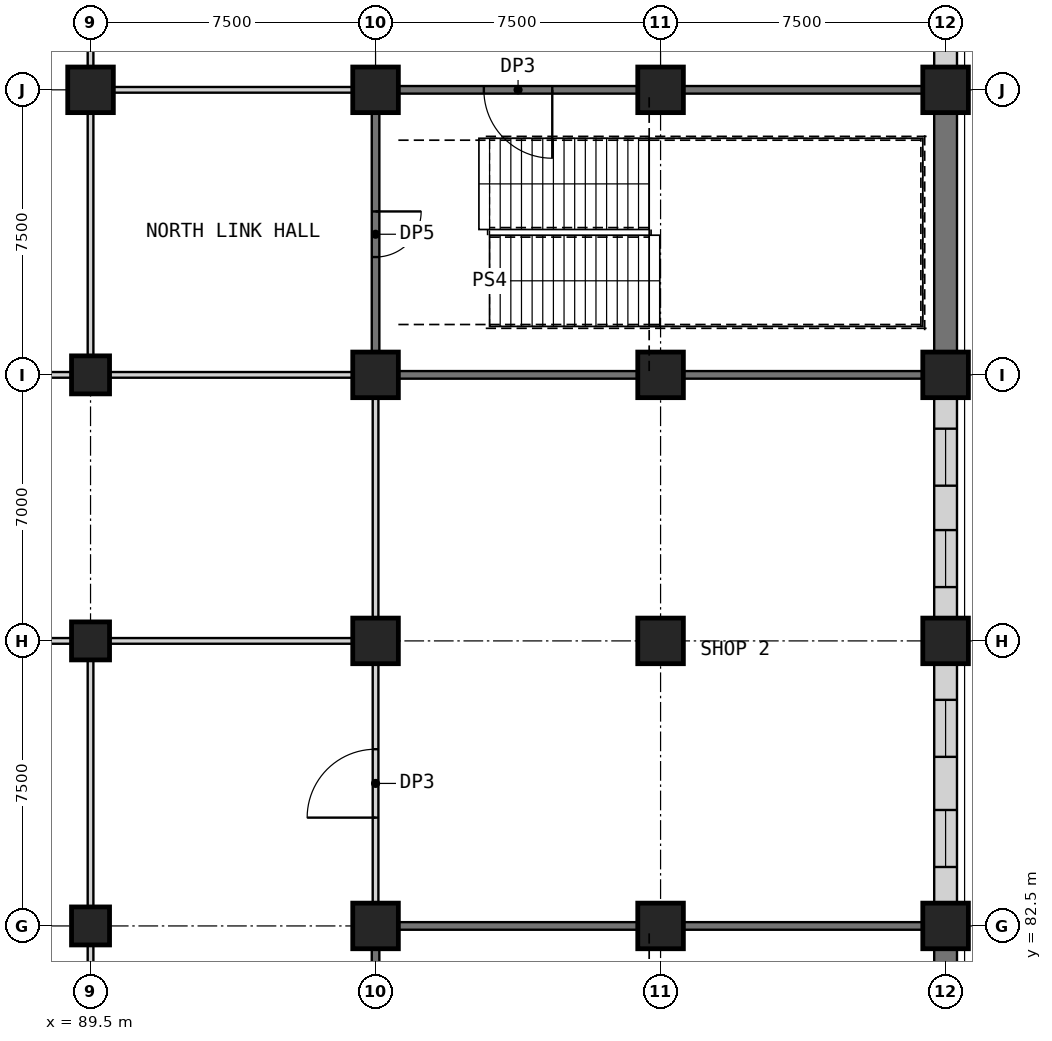
"""IFC4 building model, lengths in metres.
Left out: names, types, materials, properties, quantities, classifications, styles, units other than length and angle.
Written with IfcOpenShell. Run it as: python <this file> out.ifc"""

import sys

from ifc_helpers import new_model, si_unit, direction, frame, frame_2d, origin, origin_2d, place, context, subcontext, project, spatial, rectangle, extrude, element, fill, save


model = new_model("IFC4")
c1 = context("Model", 3, precision=1e-05, world=origin(), true_north=direction((0.0, 1.0)))
c2 = subcontext(c1, "Body", "Model", "MODEL_VIEW")
j1 = project(units=[si_unit("LENGTHUNIT", "METRE"), si_unit("PLANEANGLEUNIT", "RADIAN")], contexts=[c1])
p1 = place(None, origin())
s1 = spatial("IfcSite", under=j1, at=p1, CompositionType="ELEMENT")
p2 = place(p1, origin())
s2 = spatial("IfcBuilding", under=s1, at=p2, CompositionType="ELEMENT")
p3 = place(p2, frame((0.0, 0.0, 8.0)))
s3 = spatial("IfcBuildingStorey", under=s2, at=p3, CompositionType="ELEMENT", Elevation=8.0)
for number, where, z_axis, x_axis in (
    (1, (89.5, 82.5, 0.0), (0.0, 0.0, 1.0), (1.0, 0.0, 0.0)),
    (2, (89.5, 90.0, 0.0), (0.0, 0.0, 1.0), (1.0, 0.0, 0.0)),
    (3, (89.5, 97.0, 0.0), (0.0, 0.0, 1.0), (1.0, 0.0, 0.0)),
):
    element("IfcColumn", number, at=place(p3, frame(where, z_axis=z_axis, x_axis=x_axis)), inside=s3, PredefinedType="COLUMN", context=c2, shape_type="SweptSolid", body=[
        extrude(rectangle(XDim=1.0, YDim=1.0, at=origin_2d()), origin(), (0.0, 0.0, 1.0), 5.5),
    ])
for number, where, z_axis, x_axis in (
    (4, (89.5, 104.5, 0.0), (0.0, 0.0, 1.0), (1.0, 0.0, 0.0)),
    (5, (97.0, 82.5, 0.0), (0.0, 0.0, 1.0), (1.0, 0.0, 0.0)),
    (6, (97.0, 90.0, 0.0), (0.0, 0.0, 1.0), (1.0, 0.0, 0.0)),
    (7, (97.0, 97.0, 0.0), (0.0, 0.0, 1.0), (1.0, 0.0, 0.0)),
    (8, (97.0, 104.5, 0.0), (0.0, 0.0, 1.0), (1.0, 0.0, 0.0)),
    (9, (104.5, 82.5, 0.0), (0.0, 0.0, 1.0), (1.0, 0.0, 0.0)),
    (10, (104.5, 90.0, 0.0), (0.0, 0.0, 1.0), (1.0, 0.0, 0.0)),
    (11, (104.5, 97.0, 0.0), (0.0, 0.0, 1.0), (1.0, 0.0, 0.0)),
    (12, (104.5, 104.5, 0.0), (0.0, 0.0, 1.0), (1.0, 0.0, 0.0)),
    (13, (112.0, 82.5, 0.0), (0.0, 0.0, 1.0), (1.0, 0.0, 0.0)),
    (14, (112.0, 90.0, 0.0), (0.0, 0.0, 1.0), (1.0, 0.0, 0.0)),
    (15, (112.0, 97.0, 0.0), (0.0, 0.0, 1.0), (1.0, 0.0, 0.0)),
    (16, (112.0, 104.5, 0.0), (0.0, 0.0, 1.0), (1.0, 0.0, 0.0)),
):
    element("IfcColumn", number, at=place(p3, frame(where, z_axis=z_axis, x_axis=x_axis)), inside=s3, PredefinedType="COLUMN", context=c2, shape_type="SweptSolid", body=[
        extrude(rectangle(XDim=1.2, YDim=1.2, at=origin_2d()), origin(), (0.0, 0.0, 1.0), 5.5),
    ])
for number, where, z_axis, x_axis in (
    (17, (82.6, 97.0, 0.0), (0.0, 0.0, 1.0), (1.0, 0.0, 0.0)),
    (18, (90.0, 97.0, 0.0), (0.0, 0.0, 1.0), (1.0, 0.0, 0.0)),
):
    element("IfcWall", number, at=place(p3, frame(where, z_axis=z_axis, x_axis=x_axis)), inside=s3, PredefinedType="PARTITIONING", context=c2, shape_type="SweptSolid", body=[
        extrude(rectangle(XDim=6.4, YDim=0.15, at=frame_2d((3.2, 0.0))), origin(), (0.0, 0.0, 1.0), 5.2),
    ])
for number, where, z_axis, x_axis in (
    (19, (97.6, 97.0, 0.0), (0.0, 0.0, 1.0), (1.0, 0.0, 0.0)),
    (20, (105.1, 97.0, 0.0), (0.0, 0.0, 1.0), (1.0, 0.0, 0.0)),
    (21, (97.6, 82.5, 0.0), (0.0, 0.0, 1.0), (1.0, 0.0, 0.0)),
    (22, (105.1, 82.5, 0.0), (0.0, 0.0, 1.0), (1.0, 0.0, 0.0)),
):
    element("IfcWall", number, at=place(p3, frame(where, z_axis=z_axis, x_axis=x_axis)), inside=s3, PredefinedType="SHEAR", context=c2, shape_type="SweptSolid", body=[
        extrude(rectangle(XDim=6.3, YDim=0.2, at=frame_2d((3.15, 0.0))), origin(), (0.0, 0.0, 1.0), 5.2),
    ])
p4 = place(p3, frame((90.1, 104.5, 0.0), z_axis=(0.0, 0.0, 1.0), x_axis=(1.0, 0.0, 0.0)))
e23 = element("IfcWall", 23, at=p4, inside=s3, PredefinedType="PARTITIONING", context=c2, shape_type="SweptSolid", body=[
    extrude(rectangle(XDim=6.3, YDim=0.15, at=frame_2d((3.15, 0.0))), origin(), (0.0, 0.0, 1.0), 5.2),
])
p5 = place(p3, frame((103.9, 104.5, 0.0), z_axis=(0.0, 0.0, 1.0), x_axis=(-1.0, 0.0, 0.0)))
e24 = element("IfcWall", 24, at=p5, inside=s3, PredefinedType="SHEAR", context=c2, shape_type="SweptSolid", body=[
    extrude(rectangle(XDim=6.3, YDim=0.2, at=frame_2d((3.15, 0.0))), origin(), (0.0, 0.0, 1.0), 5.2),
])
p6 = place(p5, frame((2.25, 0.0, 0.0)))
e25 = element("IfcOpeningElement", 25, at=p6, cuts=e24, PredefinedType="OPENING", context=c2, shape_type="SweptSolid", body=[
    extrude(rectangle(XDim=1.8, YDim=2.4, at=frame_2d((0.9, 1.2))), frame((0.0, 0.11, 0.0), z_axis=(0.0, -1.0, 0.0), x_axis=(1.0, 0.0, 0.0)), (0.0, 0.0, 1.0), 0.22),
])
p7 = place(p3, frame((105.1, 104.5, 0.0), z_axis=(0.0, 0.0, 1.0), x_axis=(1.0, 0.0, 0.0)))
e26 = element("IfcWall", 26, at=p7, inside=s3, PredefinedType="SHEAR", context=c2, shape_type="SweptSolid", body=[
    extrude(rectangle(XDim=6.3, YDim=0.2, at=frame_2d((3.15, 0.0))), origin(), (0.0, 0.0, 1.0), 5.2),
])
for number, where, z_axis, x_axis in (
    (27, (82.6, 90.0, 0.0), (0.0, 0.0, 1.0), (1.0, 0.0, 0.0)),
    (28, (90.0, 90.0, 0.0), (0.0, 0.0, 1.0), (1.0, 0.0, 0.0)),
):
    element("IfcWall", number, at=place(p3, frame(where, z_axis=z_axis, x_axis=x_axis)), inside=s3, PredefinedType="PARTITIONING", context=c2, shape_type="SweptSolid", body=[
        extrude(rectangle(XDim=6.4, YDim=0.15, at=frame_2d((3.2, 0.0))), origin(), (0.0, 0.0, 1.0), 5.2),
    ])
p8 = place(p3, frame((97.0, 81.9, 0.0), z_axis=(0.0, 0.0, 1.0), x_axis=(0.0, -1.0, 0.0)))
e29 = element("IfcWall", 29, at=p8, inside=s3, PredefinedType="SHEAR", context=c2, shape_type="SweptSolid", body=[
    extrude(rectangle(XDim=6.3, YDim=0.2, at=frame_2d((3.15, 0.0))), origin(), (0.0, 0.0, 1.0), 5.2),
])
p9 = place(p8, frame((2.6, 0.0, 0.0)))
e30 = element("IfcOpeningElement", 30, at=p9, cuts=e29, PredefinedType="OPENING", context=c2, shape_type="SweptSolid", body=[
    extrude(rectangle(XDim=1.2, YDim=2.1, at=frame_2d((0.6, 1.05))), frame((0.0, 0.11, 0.0), z_axis=(0.0, -1.0, 0.0), x_axis=(1.0, 0.0, 0.0)), (0.0, 0.0, 1.0), 0.22),
])
p10 = place(p3, frame((97.0, 83.1, 0.0), z_axis=(0.0, 0.0, 1.0), x_axis=(0.0, 1.0, 0.0)))
e31 = element("IfcWall", 31, at=p10, inside=s3, PredefinedType="PARTITIONING", context=c2, shape_type="SweptSolid", body=[
    extrude(rectangle(XDim=6.3, YDim=0.15, at=frame_2d((3.15, 0.0))), origin(), (0.0, 0.0, 1.0), 5.2),
])
p11 = place(p10, frame((2.25, 0.0, 0.0)))
e32 = element("IfcOpeningElement", 32, at=p11, cuts=e31, PredefinedType="OPENING", context=c2, shape_type="SweptSolid", body=[
    extrude(rectangle(XDim=1.8, YDim=2.4, at=frame_2d((0.9, 1.2))), frame((0.0, 0.085, 0.0), z_axis=(0.0, -1.0, 0.0), x_axis=(1.0, 0.0, 0.0)), (0.0, 0.0, 1.0), 0.17),
])
p12 = place(p3, frame((97.0, 90.6, 0.0), z_axis=(0.0, 0.0, 1.0), x_axis=(0.0, 1.0, 0.0)))
e33 = element("IfcWall", 33, at=p12, inside=s3, PredefinedType="PARTITIONING", context=c2, shape_type="SweptSolid", body=[
    extrude(rectangle(XDim=5.8, YDim=0.15, at=frame_2d((2.9, 0.0))), origin(), (0.0, 0.0, 1.0), 5.2),
])
p13 = place(p3, frame((97.0, 103.9, 0.0), z_axis=(0.0, 0.0, 1.0), x_axis=(0.0, -1.0, 0.0)))
e34 = element("IfcWall", 34, at=p13, inside=s3, PredefinedType="SHEAR", context=c2, shape_type="SweptSolid", body=[
    extrude(rectangle(XDim=6.3, YDim=0.2, at=frame_2d((3.15, 0.0))), origin(), (0.0, 0.0, 1.0), 5.2),
])
p14 = place(p13, frame((2.6, 0.0, 0.0)))
e35 = element("IfcOpeningElement", 35, at=p14, cuts=e34, PredefinedType="OPENING", context=c2, shape_type="SweptSolid", body=[
    extrude(rectangle(XDim=1.2, YDim=2.1, at=frame_2d((0.6, 1.05))), frame((0.0, 0.11, 0.0), z_axis=(0.0, -1.0, 0.0), x_axis=(1.0, 0.0, 0.0)), (0.0, 0.0, 1.0), 0.22),
])
p15 = place(p3, frame((112.0, 75.6, 0.0), z_axis=(0.0, 0.0, 1.0), x_axis=(0.0, 1.0, 0.0)))
e36 = element("IfcWall", 36, at=p15, inside=s3, PredefinedType="PARTITIONING", context=c2, shape_type="SweptSolid", body=[
    extrude(rectangle(XDim=6.3, YDim=0.6, at=frame_2d((3.15, 0.0))), origin(), (0.0, 0.0, 1.0), 4.6),
])
p16 = place(p3, frame((112.0, 83.1, 0.0), z_axis=(0.0, 0.0, 1.0), x_axis=(0.0, 1.0, 0.0)))
e37 = element("IfcWall", 37, at=p16, inside=s3, PredefinedType="PARTITIONING", context=c2, shape_type="SweptSolid", body=[
    extrude(rectangle(XDim=6.3, YDim=0.6, at=frame_2d((3.15, 0.0))), origin(), (0.0, 0.0, 1.0), 4.6),
])
p17 = place(p16, frame((0.951, 0.0, 0.9)))
e38 = element("IfcOpeningElement", 38, at=p17, cuts=e37, PredefinedType="OPENING", context=c2, shape_type="SweptSolid", body=[
    extrude(rectangle(XDim=1.5, YDim=2.8, at=frame_2d((0.75, 1.4))), frame((0.0, 0.31, 0.0), z_axis=(0.0, -1.0, 0.0), x_axis=(1.0, 0.0, 0.0)), (0.0, 0.0, 1.0), 0.62),
])
p18 = place(p16, frame((3.849, 0.0, 0.9)))
e39 = element("IfcOpeningElement", 39, at=p18, cuts=e37, PredefinedType="OPENING", context=c2, shape_type="SweptSolid", body=[
    extrude(rectangle(XDim=1.5, YDim=2.8, at=frame_2d((0.75, 1.4))), frame((0.0, 0.31, 0.0), z_axis=(0.0, -1.0, 0.0), x_axis=(1.0, 0.0, 0.0)), (0.0, 0.0, 1.0), 0.62),
])
p19 = place(p3, frame((112.0, 90.6, 0.0), z_axis=(0.0, 0.0, 1.0), x_axis=(0.0, 1.0, 0.0)))
e40 = element("IfcWall", 40, at=p19, inside=s3, PredefinedType="PARTITIONING", context=c2, shape_type="SweptSolid", body=[
    extrude(rectangle(XDim=5.8, YDim=0.6, at=frame_2d((2.9, 0.0))), origin(), (0.0, 0.0, 1.0), 4.6),
])
p20 = place(p19, frame((0.816, 0.0, 0.9)))
e41 = element("IfcOpeningElement", 41, at=p20, cuts=e40, PredefinedType="OPENING", context=c2, shape_type="SweptSolid", body=[
    extrude(rectangle(XDim=1.5, YDim=2.8, at=frame_2d((0.75, 1.4))), frame((0.0, 0.31, 0.0), z_axis=(0.0, -1.0, 0.0), x_axis=(1.0, 0.0, 0.0)), (0.0, 0.0, 1.0), 0.62),
])
p21 = place(p19, frame((3.484, 0.0, 0.9)))
e42 = element("IfcOpeningElement", 42, at=p21, cuts=e40, PredefinedType="OPENING", context=c2, shape_type="SweptSolid", body=[
    extrude(rectangle(XDim=1.5, YDim=2.8, at=frame_2d((0.75, 1.4))), frame((0.0, 0.31, 0.0), z_axis=(0.0, -1.0, 0.0), x_axis=(1.0, 0.0, 0.0)), (0.0, 0.0, 1.0), 0.62),
])
p22 = place(p3, frame((112.0, 97.6, 0.0), z_axis=(0.0, 0.0, 1.0), x_axis=(0.0, 1.0, 0.0)))
e43 = element("IfcWall", 43, at=p22, inside=s3, PredefinedType="PARTITIONING", context=c2, shape_type="SweptSolid", body=[
    extrude(rectangle(XDim=6.3, YDim=0.6, at=frame_2d((3.15, 0.0))), origin(), (0.0, 0.0, 1.0), 4.6),
])
p23 = place(p3, frame((112.0, 105.1, 0.0), z_axis=(0.0, 0.0, 1.0), x_axis=(0.0, 1.0, 0.0)))
e44 = element("IfcWall", 44, at=p23, inside=s3, PredefinedType="PARTITIONING", context=c2, shape_type="SweptSolid", body=[
    extrude(rectangle(XDim=6.3, YDim=0.6, at=frame_2d((3.15, 0.0))), origin(), (0.0, 0.0, 1.0), 4.6),
])
p24 = place(p23, frame((0.951, 0.0, 0.9)))
e45 = element("IfcOpeningElement", 45, at=p24, cuts=e44, PredefinedType="OPENING", context=c2, shape_type="SweptSolid", body=[
    extrude(rectangle(XDim=1.5, YDim=2.8, at=frame_2d((0.75, 1.4))), frame((0.0, 0.31, 0.0), z_axis=(0.0, -1.0, 0.0), x_axis=(1.0, 0.0, 0.0)), (0.0, 0.0, 1.0), 0.62),
])
p25 = place(p23, frame((3.849, 0.0, 0.9)))
e46 = element("IfcOpeningElement", 46, at=p25, cuts=e44, PredefinedType="OPENING", context=c2, shape_type="SweptSolid", body=[
    extrude(rectangle(XDim=1.5, YDim=2.8, at=frame_2d((0.75, 1.4))), frame((0.0, 0.31, 0.0), z_axis=(0.0, -1.0, 0.0), x_axis=(1.0, 0.0, 0.0)), (0.0, 0.0, 1.0), 0.62),
])
for number, where, z_axis, x_axis in (
    (47, (89.5, 75.5, 0.0), (0.0, 0.0, 1.0), (0.0, 1.0, 0.0)),
    (48, (89.5, 83.0, 0.0), (0.0, 0.0, 1.0), (0.0, 1.0, 0.0)),
):
    element("IfcWall", number, at=place(p3, frame(where, z_axis=z_axis, x_axis=x_axis)), inside=s3, PredefinedType="PARTITIONING", context=c2, shape_type="SweptSolid", body=[
        extrude(rectangle(XDim=6.5, YDim=0.15, at=frame_2d((3.25, 0.0))), origin(), (0.0, 0.0, 1.0), 5.2),
    ])
p26 = place(p3, frame((89.5, 97.5, 0.0), z_axis=(0.0, 0.0, 1.0), x_axis=(0.0, 1.0, 0.0)))
e49 = element("IfcWall", 49, at=p26, inside=s3, PredefinedType="PARTITIONING", context=c2, shape_type="SweptSolid", body=[
    extrude(rectangle(XDim=6.4, YDim=0.15, at=frame_2d((3.2, 0.0))), origin(), (0.0, 0.0, 1.0), 5.2),
])
p27 = place(p3, frame((89.5, 105.1, 0.0), z_axis=(0.0, 0.0, 1.0), x_axis=(0.0, 1.0, 0.0)))
e50 = element("IfcWall", 50, at=p27, inside=s3, PredefinedType="PARTITIONING", context=c2, shape_type="SweptSolid", body=[
    extrude(rectangle(XDim=6.3, YDim=0.15, at=frame_2d((3.15, 0.0))), origin(), (0.0, 0.0, 1.0), 5.2),
])
p28 = place(p6, origin())
e51 = element("IfcDoor", 51, at=p28, inside=s3, OperationType="SINGLE_SWING_LEFT", PredefinedType="DOOR", context=c2, shape_type="SweptSolid", body=[
    extrude(rectangle(XDim=1.8, YDim=2.4, at=frame_2d((0.9, 1.2))), frame((0.0, 0.025, 0.0), z_axis=(0.0, -1.0, 0.0), x_axis=(1.0, 0.0, 0.0)), (0.0, 0.0, 1.0), 0.05),
])
fill(e25, e51)
p29 = place(p11, origin())
e52 = element("IfcDoor", 52, at=p29, inside=s3, OperationType="SINGLE_SWING_LEFT", PredefinedType="DOOR", context=c2, shape_type="SweptSolid", body=[
    extrude(rectangle(XDim=1.8, YDim=2.4, at=frame_2d((0.9, 1.2))), frame((0.0, 0.025, 0.0), z_axis=(0.0, -1.0, 0.0), x_axis=(1.0, 0.0, 0.0)), (0.0, 0.0, 1.0), 0.05),
])
fill(e32, e52)
p30 = place(p14, origin())
e53 = element("IfcDoor", 53, at=p30, inside=s3, OperationType="SINGLE_SWING_LEFT", PredefinedType="DOOR", context=c2, shape_type="SweptSolid", body=[
    extrude(rectangle(XDim=1.2, YDim=2.1, at=frame_2d((0.6, 1.05))), frame((0.0, 0.025, 0.0), z_axis=(0.0, -1.0, 0.0), x_axis=(1.0, 0.0, 0.0)), (0.0, 0.0, 1.0), 0.05),
])
fill(e35, e53)
p31 = place(p17, origin())
e54 = element("IfcWindow", 54, at=p31, inside=s3, PartitioningType="SINGLE_PANEL", PredefinedType="WINDOW", context=c2, shape_type="SweptSolid", body=[
    extrude(rectangle(XDim=1.5, YDim=2.8, at=frame_2d((0.75, 1.4))), frame((0.0, 0.03, 0.0), z_axis=(0.0, -1.0, 0.0), x_axis=(1.0, 0.0, 0.0)), (0.0, 0.0, 1.0), 0.06),
])
fill(e38, e54)
p32 = place(p18, origin())
e55 = element("IfcWindow", 55, at=p32, inside=s3, PartitioningType="SINGLE_PANEL", PredefinedType="WINDOW", context=c2, shape_type="SweptSolid", body=[
    extrude(rectangle(XDim=1.5, YDim=2.8, at=frame_2d((0.75, 1.4))), frame((0.0, 0.03, 0.0), z_axis=(0.0, -1.0, 0.0), x_axis=(1.0, 0.0, 0.0)), (0.0, 0.0, 1.0), 0.06),
])
fill(e39, e55)
p33 = place(p20, origin())
e56 = element("IfcWindow", 56, at=p33, inside=s3, PartitioningType="SINGLE_PANEL", PredefinedType="WINDOW", context=c2, shape_type="SweptSolid", body=[
    extrude(rectangle(XDim=1.5, YDim=2.8, at=frame_2d((0.75, 1.4))), frame((0.0, 0.03, 0.0), z_axis=(0.0, -1.0, 0.0), x_axis=(1.0, 0.0, 0.0)), (0.0, 0.0, 1.0), 0.06),
])
fill(e41, e56)
p34 = place(p21, origin())
e57 = element("IfcWindow", 57, at=p34, inside=s3, PartitioningType="SINGLE_PANEL", PredefinedType="WINDOW", context=c2, shape_type="SweptSolid", body=[
    extrude(rectangle(XDim=1.5, YDim=2.8, at=frame_2d((0.75, 1.4))), frame((0.0, 0.03, 0.0), z_axis=(0.0, -1.0, 0.0), x_axis=(1.0, 0.0, 0.0)), (0.0, 0.0, 1.0), 0.06),
])
fill(e42, e57)
save(model, sys.argv[1])
